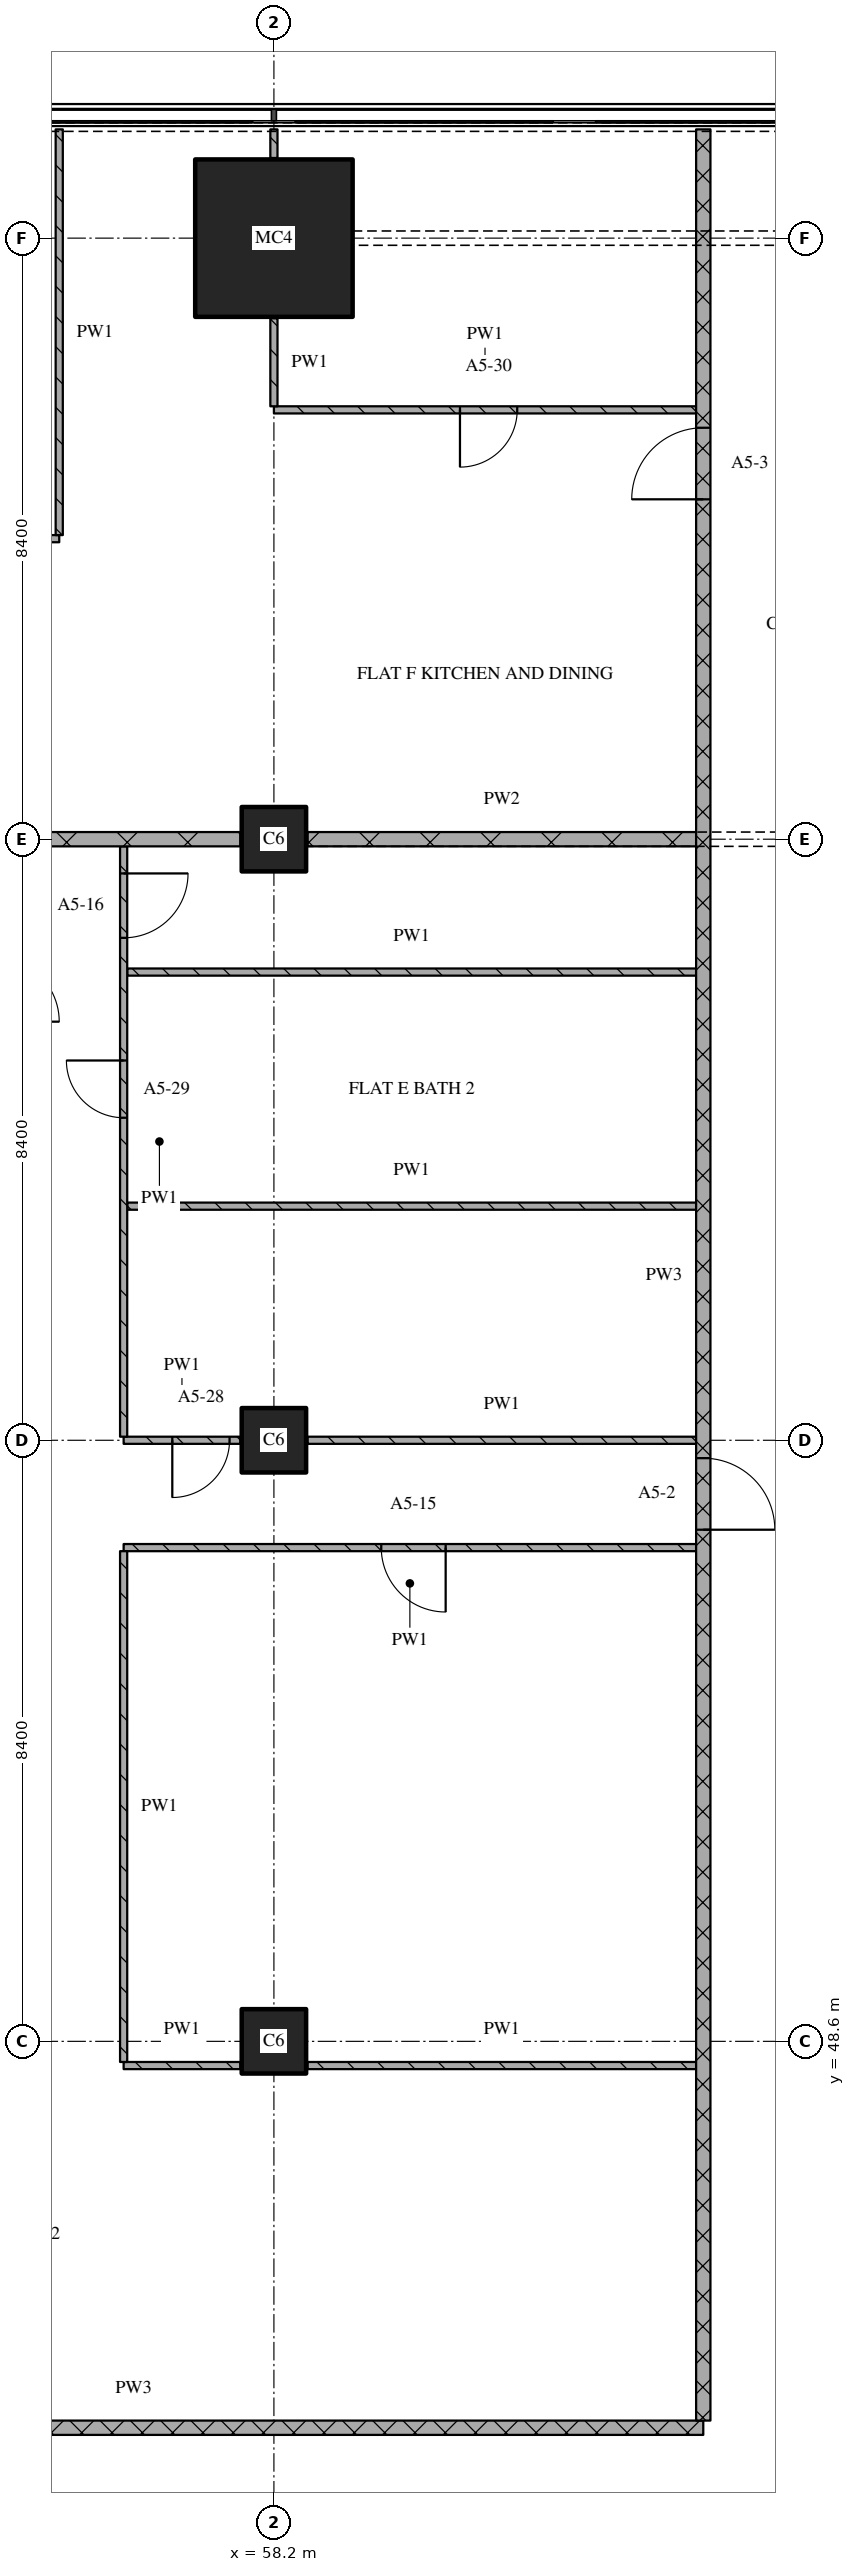
"""IFC4 building model, lengths in metres.
Left out: names, types, materials, properties, quantities, classifications, styles, units other than length and angle.
Written with IfcOpenShell. Run it as: python <this file> out.ifc"""

import sys

from ifc_helpers import new_model, si_unit, direction, frame, frame_2d, origin, origin_2d, place, context, subcontext, project, spatial, rectangle, extrude, element, fill, save


model = new_model("IFC4")
c1 = context("Model", 3, precision=1e-05, world=origin(), true_north=direction((0.0, 1.0)))
c2 = subcontext(c1, "Body", "Model", "MODEL_VIEW")
j1 = project(units=[si_unit("LENGTHUNIT", "METRE"), si_unit("PLANEANGLEUNIT", "RADIAN")], contexts=[c1])
p1 = place(None, origin())
s1 = spatial("IfcSite", under=j1, at=p1, CompositionType="ELEMENT")
p2 = place(p1, origin())
s2 = spatial("IfcBuilding", under=s1, at=p2, CompositionType="ELEMENT")
p3 = place(p2, frame((0.0, 0.0, 80.4)))
s3 = spatial("IfcBuildingStorey", under=s2, at=p3, CompositionType="ELEMENT", Elevation=80.4)
for number, where, z_axis, x_axis in (
    (1, (58.2, 48.6, 0.0), (0.0, 0.0, 1.0), (1.0, 0.0, 0.0)),
    (2, (58.2, 57.0, 0.0), (0.0, 0.0, 1.0), (1.0, 0.0, 0.0)),
    (3, (58.2, 65.4, 0.0), (0.0, 0.0, 1.0), (1.0, 0.0, 0.0)),
):
    element("IfcColumn", number, at=place(p3, frame(where, z_axis=z_axis, x_axis=x_axis)), inside=s3, PredefinedType="COLUMN", context=c2, shape_type="SweptSolid", body=[
        extrude(rectangle(XDim=0.9, YDim=0.9, at=origin_2d()), origin(), (0.0, 0.0, 1.0), 3.6),
    ])
p4 = place(p3, frame((58.2, 73.8, 0.0), z_axis=(0.0, 0.0, 1.0), x_axis=(1.0, 0.0, 0.0)))
e4 = element("IfcColumn", 4, at=p4, inside=s3, PredefinedType="COLUMN", context=c2, shape_type="SweptSolid", body=[
    extrude(rectangle(XDim=2.2, YDim=2.2, at=origin_2d()), origin(), (0.0, 0.0, 1.0), 3.6),
])
p5 = place(p3, frame((48.28, 43.2, 0.0), z_axis=(0.0, 0.0, 1.0), x_axis=(1.0, 0.0, 0.0)))
e5 = element("IfcWall", 5, at=p5, inside=s3, PredefinedType="PARTITIONING", context=c2, shape_type="SweptSolid", body=[
    extrude(rectangle(XDim=15.92, YDim=0.2, at=frame_2d((7.96, 0.0))), origin(), (0.0, 0.0, 1.0), 3.3),
])
p6 = place(p3, frame((56.1, 48.262, 0.0), z_axis=(0.0, 0.0, 1.0), x_axis=(1.0, 0.0, 0.0)))
e6 = element("IfcWall", 6, at=p6, inside=s3, PredefinedType="PARTITIONING", context=c2, shape_type="SweptSolid", body=[
    extrude(rectangle(XDim=1.63, YDim=0.1, at=frame_2d((0.815, 0.0))), origin(), (0.0, 0.0, 1.0), 3.3),
])
p7 = place(p3, frame((58.67, 48.262, 0.0), z_axis=(0.0, 0.0, 1.0), x_axis=(1.0, 0.0, 0.0)))
e7 = element("IfcWall", 7, at=p7, inside=s3, PredefinedType="PARTITIONING", context=c2, shape_type="SweptSolid", body=[
    extrude(rectangle(XDim=5.43, YDim=0.1, at=frame_2d((2.715, 0.0))), origin(), (0.0, 0.0, 1.0), 3.3),
])
p8 = place(p3, frame((64.1, 55.5, 0.0), z_axis=(0.0, 0.0, 1.0), x_axis=(-1.0, 0.0, 0.0)))
e8 = element("IfcWall", 8, at=p8, inside=s3, PredefinedType="PARTITIONING", context=c2, shape_type="SweptSolid", body=[
    extrude(rectangle(XDim=8.0, YDim=0.1, at=frame_2d((4.0, 0.0))), origin(), (0.0, 0.0, 1.0), 3.3),
])
p9 = place(p8, frame((3.5, 0.0, 0.0)))
e9 = element("IfcOpeningElement", 9, at=p9, cuts=e8, PredefinedType="OPENING", context=c2, shape_type="SweptSolid", body=[
    extrude(rectangle(XDim=0.9, YDim=2.1, at=frame_2d((0.45, 1.05))), frame((0.0, 0.06, 0.0), z_axis=(0.0, -1.0, 0.0), x_axis=(1.0, 0.0, 0.0)), (0.0, 0.0, 1.0), 0.12),
])
p10 = place(p3, frame((56.1, 57.0, 0.0), z_axis=(0.0, 0.0, 1.0), x_axis=(1.0, 0.0, 0.0)))
e10 = element("IfcWall", 10, at=p10, inside=s3, PredefinedType="PARTITIONING", context=c2, shape_type="SweptSolid", body=[
    extrude(rectangle(XDim=1.63, YDim=0.1, at=frame_2d((0.815, 0.0))), origin(), (0.0, 0.0, 1.0), 3.3),
])
p11 = place(p10, frame((0.68, 0.0, 0.0)))
e11 = element("IfcOpeningElement", 11, at=p11, cuts=e10, PredefinedType="OPENING", context=c2, shape_type="SweptSolid", body=[
    extrude(rectangle(XDim=0.8, YDim=2.1, at=frame_2d((0.4, 1.05))), frame((0.0, 0.06, 0.0), z_axis=(0.0, -1.0, 0.0), x_axis=(1.0, 0.0, 0.0)), (0.0, 0.0, 1.0), 0.12),
])
p12 = place(p3, frame((58.67, 57.0, 0.0), z_axis=(0.0, 0.0, 1.0), x_axis=(1.0, 0.0, 0.0)))
e12 = element("IfcWall", 12, at=p12, inside=s3, PredefinedType="PARTITIONING", context=c2, shape_type="SweptSolid", body=[
    extrude(rectangle(XDim=5.43, YDim=0.1, at=frame_2d((2.715, 0.0))), origin(), (0.0, 0.0, 1.0), 3.3),
])
for number, where, z_axis, x_axis in (
    (13, (56.15, 60.271, 0.0), (0.0, 0.0, 1.0), (1.0, 0.0, 0.0)),
    (14, (56.15, 63.543, 0.0), (0.0, 0.0, 1.0), (1.0, 0.0, 0.0)),
):
    element("IfcWall", number, at=place(p3, frame(where, z_axis=z_axis, x_axis=x_axis)), inside=s3, PredefinedType="PARTITIONING", context=c2, shape_type="SweptSolid", body=[
        extrude(rectangle(XDim=7.95, YDim=0.1, at=frame_2d((3.975, 0.0))), origin(), (0.0, 0.0, 1.0), 3.3),
    ])
p13 = place(p3, frame((50.92, 65.4, 0.0), z_axis=(0.0, 0.0, 1.0), x_axis=(1.0, 0.0, 0.0)))
e15 = element("IfcWall", 15, at=p13, inside=s3, PredefinedType="PARTITIONING", context=c2, shape_type="SweptSolid", body=[
    extrude(rectangle(XDim=6.81, YDim=0.2, at=frame_2d((3.405, 0.0))), origin(), (0.0, 0.0, 1.0), 2.41),
])
p14 = place(p3, frame((58.67, 65.4, 0.0), z_axis=(0.0, 0.0, 1.0), x_axis=(1.0, 0.0, 0.0)))
e16 = element("IfcWall", 16, at=p14, inside=s3, PredefinedType="PARTITIONING", context=c2, shape_type="SweptSolid", body=[
    extrude(rectangle(XDim=5.43, YDim=0.2, at=frame_2d((2.715, 0.0))), origin(), (0.0, 0.0, 1.0), 2.8),
])
p15 = place(p3, frame((48.28, 69.6, 0.0), z_axis=(0.0, 0.0, 1.0), x_axis=(1.0, 0.0, 0.0)))
e17 = element("IfcWall", 17, at=p15, inside=s3, PredefinedType="PARTITIONING", context=c2, shape_type="SweptSolid", body=[
    extrude(rectangle(XDim=6.92, YDim=0.1, at=frame_2d((3.46, 0.0))), origin(), (0.0, 0.0, 1.0), 3.3),
])
p16 = place(p15, frame((3.905, 0.0, 0.0)))
e18 = element("IfcOpeningElement", 18, at=p16, cuts=e17, PredefinedType="OPENING", context=c2, shape_type="SweptSolid", body=[
    extrude(rectangle(XDim=0.9, YDim=2.1, at=frame_2d((0.45, 1.05))), frame((0.0, 0.06, 0.0), z_axis=(0.0, -1.0, 0.0), x_axis=(1.0, 0.0, 0.0)), (0.0, 0.0, 1.0), 0.12),
])
p17 = place(p3, frame((58.2, 71.4, 0.0), z_axis=(0.0, 0.0, 1.0), x_axis=(1.0, 0.0, 0.0)))
e19 = element("IfcWall", 19, at=p17, inside=s3, PredefinedType="PARTITIONING", context=c2, shape_type="SweptSolid", body=[
    extrude(rectangle(XDim=5.9, YDim=0.1, at=frame_2d((2.95, 0.0))), origin(), (0.0, 0.0, 1.0), 3.3),
])
p18 = place(p17, frame((2.6, 0.0, 0.0)))
e20 = element("IfcOpeningElement", 20, at=p18, cuts=e19, PredefinedType="OPENING", context=c2, shape_type="SweptSolid", body=[
    extrude(rectangle(XDim=0.8, YDim=2.1, at=frame_2d((0.4, 1.05))), frame((0.0, 0.06, 0.0), z_axis=(0.0, -1.0, 0.0), x_axis=(1.0, 0.0, 0.0)), (0.0, 0.0, 1.0), 0.12),
])
p19 = place(p3, frame((55.2, 75.32, 0.0), z_axis=(0.0, 0.0, 1.0), x_axis=(0.0, -1.0, 0.0)))
e21 = element("IfcWall", 21, at=p19, inside=s3, PredefinedType="PARTITIONING", context=c2, shape_type="SweptSolid", body=[
    extrude(rectangle(XDim=5.67, YDim=0.1, at=frame_2d((2.835, 0.0))), origin(), (0.0, 0.0, 1.0), 3.3),
])
p20 = place(p3, frame((56.1, 55.45, 0.0), z_axis=(0.0, 0.0, 1.0), x_axis=(0.0, -1.0, 0.0)))
e22 = element("IfcWall", 22, at=p20, inside=s3, PredefinedType="PARTITIONING", context=c2, shape_type="SweptSolid", body=[
    extrude(rectangle(XDim=7.138, YDim=0.1, at=frame_2d((3.569, 0.0))), origin(), (0.0, 0.0, 1.0), 3.3),
])
p21 = place(p3, frame((56.1, 65.3, 0.0), z_axis=(0.0, 0.0, 1.0), x_axis=(0.0, -1.0, 0.0)))
e23 = element("IfcWall", 23, at=p21, inside=s3, PredefinedType="PARTITIONING", context=c2, shape_type="SweptSolid", body=[
    extrude(rectangle(XDim=8.25, YDim=0.1, at=frame_2d((4.125, 0.0))), origin(), (0.0, 0.0, 1.0), 3.3),
])
p22 = place(p21, frame((0.378, 0.0, 0.0)))
e24 = element("IfcOpeningElement", 24, at=p22, cuts=e23, PredefinedType="OPENING", context=c2, shape_type="SweptSolid", body=[
    extrude(rectangle(XDim=0.9, YDim=2.1, at=frame_2d((0.45, 1.05))), frame((0.0, 0.06, 0.0), z_axis=(0.0, -1.0, 0.0), x_axis=(1.0, 0.0, 0.0)), (0.0, 0.0, 1.0), 0.12),
])
p23 = place(p21, frame((2.993, 0.0, 0.0)))
e25 = element("IfcOpeningElement", 25, at=p23, cuts=e23, PredefinedType="OPENING", context=c2, shape_type="SweptSolid", body=[
    extrude(rectangle(XDim=0.8, YDim=2.1, at=frame_2d((0.4, 1.05))), frame((0.0, 0.06, 0.0), z_axis=(0.0, -1.0, 0.0), x_axis=(1.0, 0.0, 0.0)), (0.0, 0.0, 1.0), 0.12),
])
p24 = place(p3, frame((58.2, 72.68, 0.0), z_axis=(0.0, 0.0, 1.0), x_axis=(0.0, -1.0, 0.0)))
e26 = element("IfcWall", 26, at=p24, inside=s3, PredefinedType="PARTITIONING", context=c2, shape_type="SweptSolid", body=[
    extrude(rectangle(XDim=1.23, YDim=0.1, at=frame_2d((0.615, 0.0))), origin(), (0.0, 0.0, 1.0), 3.3),
])
p25 = place(p3, frame((58.2, 75.32, 0.0), z_axis=(0.0, 0.0, 1.0), x_axis=(0.0, -1.0, 0.0)))
e27 = element("IfcWall", 27, at=p25, inside=s3, PredefinedType="PARTITIONING", context=c2, shape_type="SweptSolid", body=[
    extrude(rectangle(XDim=0.4, YDim=0.1, at=frame_2d((0.2, 0.0))), origin(), (0.0, 0.0, 1.0), 3.3),
])
p26 = place(p3, frame((64.2, 43.3, 0.0), z_axis=(0.0, 0.0, 1.0), x_axis=(0.0, 1.0, 0.0)))
e28 = element("IfcWall", 28, at=p26, inside=s3, PredefinedType="PARTITIONING", context=c2, shape_type="SweptSolid", body=[
    extrude(rectangle(XDim=32.02, YDim=0.2, at=frame_2d((16.01, 0.0))), origin(), (0.0, 0.0, 1.0), 3.3),
])
p27 = place(p26, frame((12.45, 0.0, 0.0)))
e29 = element("IfcOpeningElement", 29, at=p27, cuts=e28, PredefinedType="OPENING", context=c2, shape_type="SweptSolid", body=[
    extrude(rectangle(XDim=1.0, YDim=2.1, at=frame_2d((0.5, 1.05))), frame((0.0, 0.11, 0.0), z_axis=(0.0, -1.0, 0.0), x_axis=(1.0, 0.0, 0.0)), (0.0, 0.0, 1.0), 0.22),
])
p28 = place(p26, frame((26.85, 0.0, 0.0)))
e30 = element("IfcOpeningElement", 30, at=p28, cuts=e28, PredefinedType="OPENING", context=c2, shape_type="SweptSolid", body=[
    extrude(rectangle(XDim=1.0, YDim=2.1, at=frame_2d((0.5, 1.05))), frame((0.0, 0.11, 0.0), z_axis=(0.0, -1.0, 0.0), x_axis=(1.0, 0.0, 0.0)), (0.0, 0.0, 1.0), 0.22),
])
p29 = place(p9, origin())
e31 = element("IfcDoor", 31, at=p29, inside=s3, OperationType="SINGLE_SWING_LEFT", PredefinedType="DOOR", context=c2, shape_type="SweptSolid", body=[
    extrude(rectangle(XDim=0.9, YDim=2.1, at=frame_2d((0.45, 1.05))), frame((0.0, 0.025, 0.0), z_axis=(0.0, -1.0, 0.0), x_axis=(1.0, 0.0, 0.0)), (0.0, 0.0, 1.0), 0.05),
])
fill(e9, e31)
p30 = place(p11, origin())
e32 = element("IfcDoor", 32, at=p30, inside=s3, OperationType="SINGLE_SWING_RIGHT", PredefinedType="DOOR", context=c2, shape_type="SweptSolid", body=[
    extrude(rectangle(XDim=0.8, YDim=2.1, at=frame_2d((0.4, 1.05))), frame((0.0, 0.025, 0.0), z_axis=(0.0, -1.0, 0.0), x_axis=(1.0, 0.0, 0.0)), (0.0, 0.0, 1.0), 0.05),
])
fill(e11, e32)
p31 = place(p18, origin())
e33 = element("IfcDoor", 33, at=p31, inside=s3, OperationType="SINGLE_SWING_RIGHT", PredefinedType="DOOR", context=c2, shape_type="SweptSolid", body=[
    extrude(rectangle(XDim=0.8, YDim=2.1, at=frame_2d((0.4, 1.05))), frame((0.0, 0.025, 0.0), z_axis=(0.0, -1.0, 0.0), x_axis=(1.0, 0.0, 0.0)), (0.0, 0.0, 1.0), 0.05),
])
fill(e20, e33)
p32 = place(p22, origin())
e34 = element("IfcDoor", 34, at=p32, inside=s3, OperationType="SINGLE_SWING_LEFT", PredefinedType="DOOR", context=c2, shape_type="SweptSolid", body=[
    extrude(rectangle(XDim=0.9, YDim=2.1, at=frame_2d((0.45, 1.05))), frame((0.0, 0.025, 0.0), z_axis=(0.0, -1.0, 0.0), x_axis=(1.0, 0.0, 0.0)), (0.0, 0.0, 1.0), 0.05),
])
fill(e24, e34)
p33 = place(p23, origin())
e35 = element("IfcDoor", 35, at=p33, inside=s3, OperationType="SINGLE_SWING_RIGHT", PredefinedType="DOOR", context=c2, shape_type="SweptSolid", body=[
    extrude(rectangle(XDim=0.8, YDim=2.1, at=frame_2d((0.4, 1.05))), frame((0.0, 0.025, 0.0), z_axis=(0.0, -1.0, 0.0), x_axis=(1.0, 0.0, 0.0)), (0.0, 0.0, 1.0), 0.05),
])
fill(e25, e35)
p34 = place(p27, origin())
e36 = element("IfcDoor", 36, at=p34, inside=s3, OperationType="SINGLE_SWING_RIGHT", PredefinedType="DOOR", context=c2, shape_type="SweptSolid", body=[
    extrude(rectangle(XDim=1.0, YDim=2.1, at=frame_2d((0.5, 1.05))), frame((0.0, 0.025, 0.0), z_axis=(0.0, -1.0, 0.0), x_axis=(1.0, 0.0, 0.0)), (0.0, 0.0, 1.0), 0.05),
])
fill(e29, e36)
p35 = place(p28, origin())
e37 = element("IfcDoor", 37, at=p35, inside=s3, OperationType="SINGLE_SWING_LEFT", PredefinedType="DOOR", context=c2, shape_type="SweptSolid", body=[
    extrude(rectangle(XDim=1.0, YDim=2.1, at=frame_2d((0.5, 1.05))), frame((0.0, 0.025, 0.0), z_axis=(0.0, -1.0, 0.0), x_axis=(1.0, 0.0, 0.0)), (0.0, 0.0, 1.0), 0.05),
])
fill(e30, e37)
save(model, sys.argv[1])
